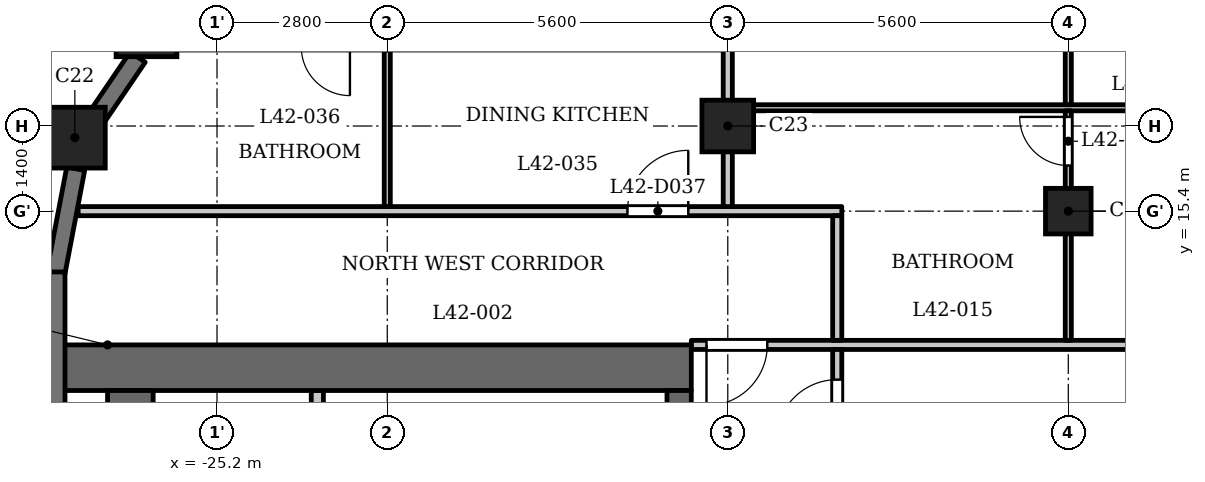
"""IFC4 building model, lengths in metres.
Left out: names, types, materials, properties, quantities, classifications, styles, units other than length and angle.
Written with IfcOpenShell. Run it as: python <this file> out.ifc"""

import sys

from ifc_helpers import new_model, si_unit, direction, frame, frame_2d, origin, origin_2d, place, context, subcontext, project, spatial, rectangle, extrude, element, fill, save


model = new_model("IFC4")
c1 = context("Model", 3, precision=1e-05, world=origin(), true_north=direction((0.0, 1.0)))
c2 = subcontext(c1, "Body", "Model", "MODEL_VIEW")
j1 = project(units=[si_unit("LENGTHUNIT", "METRE"), si_unit("PLANEANGLEUNIT", "RADIAN")], contexts=[c1])
p1 = place(None, origin())
s1 = spatial("IfcSite", under=j1, at=p1, CompositionType="ELEMENT")
p2 = place(p1, origin())
s2 = spatial("IfcBuilding", under=s1, at=p2, CompositionType="ELEMENT")
p3 = place(p2, frame((0.0, 0.0, 164.1)))
s3 = spatial("IfcBuildingStorey", under=s2, at=p3, CompositionType="ELEMENT", Elevation=164.1)
for number, where, z_axis, x_axis in (
    (1, (-26.36, 18.44, 0.0), (0.0, 0.0, 1.0), (1.0, 0.0, 0.0)),
    (2, (-27.538, 16.609, 0.0), (0.0, 0.0, 1.0), (1.0, 0.0, 0.0)),
):
    element("IfcColumn", number, at=place(p3, frame(where, z_axis=z_axis, x_axis=x_axis)), inside=s3, PredefinedType="COLUMN", context=c2, shape_type="SweptSolid", body=[
        extrude(rectangle(XDim=1.0, YDim=1.0, at=origin_2d()), origin(), (0.0, 0.0, 1.0), 3.5),
    ])
p4 = place(p3, frame((-16.8, 16.8, 0.0), z_axis=(0.0, 0.0, 1.0), x_axis=(1.0, 0.0, 0.0)))
e3 = element("IfcColumn", 3, at=p4, inside=s3, PredefinedType="COLUMN", context=c2, shape_type="SweptSolid", body=[
    extrude(rectangle(XDim=0.85, YDim=0.85, at=origin_2d()), origin(), (0.0, 0.0, 1.0), 3.5),
])
p5 = place(p3, frame((-11.2, 15.4, 0.0), z_axis=(0.0, 0.0, 1.0), x_axis=(1.0, 0.0, 0.0)))
e4 = element("IfcColumn", 4, at=p5, inside=s3, PredefinedType="COLUMN", context=c2, shape_type="SweptSolid", body=[
    extrude(rectangle(XDim=0.75, YDim=0.75, at=origin_2d()), origin(), (0.0, 0.0, 1.0), 3.5),
])
p6 = place(p3, frame((-26.504, 17.934, 0.0), z_axis=(0.0, 0.0, 1.0), x_axis=(-0.562145470373, -0.827038372833, 0.0)))
e5 = element("IfcWall", 5, at=p6, inside=s3, PredefinedType="SOLIDWALL", context=c2, shape_type="SweptSolid", body=[
    extrude(rectangle(XDim=1.177, YDim=0.3, at=frame_2d((0.588, 0.0))), origin(), (0.0, 0.0, 1.0), 3.2),
])
p7 = place(p3, frame((-27.524, 16.097, 0.0), z_axis=(0.0, 0.0, 1.0), x_axis=(-0.187259034321, -0.982310569049, 0.0)))
e6 = element("IfcWall", 6, at=p7, inside=s3, PredefinedType="SOLIDWALL", context=c2, shape_type="SweptSolid", body=[
    extrude(rectangle(XDim=1.756, YDim=0.3, at=frame_2d((0.878, 0.0))), origin(), (0.0, 0.0, 1.0), 2.45),
])
p8 = place(p3, frame((-27.85, 14.4, 0.0), z_axis=(0.0, 0.0, 1.0), x_axis=(0.0, -1.0, 0.0)))
e7 = element("IfcWall", 7, at=p8, inside=s3, PredefinedType="SOLIDWALL", context=c2, shape_type="SweptSolid", body=[
    extrude(rectangle(XDim=2.7, YDim=0.3, at=frame_2d((1.35, 0.0))), origin(), (0.0, 0.0, 1.0), 2.45),
])
p9 = place(p3, frame((-17.4, 12.825, 0.0), z_axis=(0.0, 0.0, 1.0), x_axis=(-1.0, 0.0, 0.0)))
e8 = element("IfcWall", 8, at=p9, inside=s3, PredefinedType="SHEAR", context=c2, shape_type="SweptSolid", body=[
    extrude(rectangle(XDim=10.4, YDim=0.75, at=frame_2d((5.2, 0.0))), origin(), (0.0, 0.0, 1.0), 3.2),
])
p10 = place(p3, frame((-17.6, -12.45, 0.0), z_axis=(0.0, 0.0, 1.0), x_axis=(0.0, 1.0, 0.0)))
e9 = element("IfcWall", 9, at=p10, inside=s3, PredefinedType="SHEAR", context=c2, shape_type="SweptSolid", body=[
    extrude(rectangle(XDim=24.9, YDim=0.4, at=frame_2d((12.45, 0.0))), origin(), (0.0, 0.0, 1.0), 3.2),
])
p11 = place(p10, frame((8.65, 0.0, 0.0)))
e10 = element("IfcOpeningElement", 10, at=p11, cuts=e9, PredefinedType="OPENING", context=c2, shape_type="SweptSolid", body=[
    extrude(rectangle(XDim=0.9, YDim=2.1, at=frame_2d((0.45, 1.05))), frame((0.0, 0.21, 0.0), z_axis=(0.0, -1.0, 0.0), x_axis=(1.0, 0.0, 0.0)), (0.0, 0.0, 1.0), 0.42),
])
p12 = place(p10, frame((15.6, 0.0, 0.0)))
e11 = element("IfcOpeningElement", 11, at=p12, cuts=e9, PredefinedType="OPENING", context=c2, shape_type="SweptSolid", body=[
    extrude(rectangle(XDim=1.1, YDim=2.1, at=frame_2d((0.55, 1.05))), frame((0.0, 0.21, 0.0), z_axis=(0.0, -1.0, 0.0), x_axis=(1.0, 0.0, 0.0)), (0.0, 0.0, 1.0), 0.42),
])
p13 = place(p10, frame((18.0, 0.0, 0.0)))
e12 = element("IfcOpeningElement", 12, at=p13, cuts=e9, PredefinedType="OPENING", context=c2, shape_type="SweptSolid", body=[
    extrude(rectangle(XDim=1.1, YDim=2.1, at=frame_2d((0.55, 1.05))), frame((0.0, 0.21, 0.0), z_axis=(0.0, -1.0, 0.0), x_axis=(1.0, 0.0, 0.0)), (0.0, 0.0, 1.0), 0.42),
])
p14 = place(p10, frame((23.025, 0.0, 0.0)))
e13 = element("IfcOpeningElement", 13, at=p14, cuts=e9, PredefinedType="OPENING", context=c2, shape_type="SweptSolid", body=[
    extrude(rectangle(XDim=1.1, YDim=2.1, at=frame_2d((0.55, 1.05))), frame((0.0, 0.21, 0.0), z_axis=(0.0, -1.0, 0.0), x_axis=(1.0, 0.0, 0.0)), (0.0, 0.0, 1.0), 0.42),
])
p15 = place(p10, frame((0.775, 0.0, 0.0)))
e14 = element("IfcOpeningElement", 14, at=p15, cuts=e9, PredefinedType="OPENING", context=c2, shape_type="SweptSolid", body=[
    extrude(rectangle(XDim=1.1, YDim=2.1, at=frame_2d((0.55, 1.05))), frame((0.0, 0.21, 0.0), z_axis=(0.0, -1.0, 0.0), x_axis=(1.0, 0.0, 0.0)), (0.0, 0.0, 1.0), 0.42),
])
p16 = place(p10, frame((12.925, 0.0, 0.0)))
e15 = element("IfcOpeningElement", 15, at=p16, cuts=e9, PredefinedType="OPENING", context=c2, shape_type="SweptSolid", body=[
    extrude(rectangle(XDim=1.8, YDim=2.1, at=frame_2d((0.9, 1.05))), frame((0.0, 0.21, 0.0), z_axis=(0.0, -1.0, 0.0), x_axis=(1.0, 0.0, 0.0)), (0.0, 0.0, 1.0), 0.42),
])
p17 = place(p3, frame((-26.625, -12.45, 0.0), z_axis=(0.0, 0.0, 1.0), x_axis=(0.0, 1.0, 0.0)))
e16 = element("IfcWall", 16, at=p17, inside=s3, PredefinedType="SHEAR", context=c2, shape_type="SweptSolid", body=[
    extrude(rectangle(XDim=24.9, YDim=0.75, at=frame_2d((12.45, 0.0))), origin(), (0.0, 0.0, 1.0), 3.2),
])
p18 = place(p3, frame((-23.55, 9.8, 0.0), z_axis=(0.0, 0.0, 1.0), x_axis=(0.0, 1.0, 0.0)))
e17 = element("IfcWall", 17, at=p18, inside=s3, PredefinedType="PARTITIONING", context=c2, shape_type="SweptSolid", body=[
    extrude(rectangle(XDim=2.65, YDim=0.2, at=frame_2d((1.325, 0.0))), origin(), (0.0, 0.0, 1.0), 3.2),
])
p19 = place(p18, frame((0.875, 0.0, 0.0)))
e18 = element("IfcOpeningElement", 18, at=p19, cuts=e17, PredefinedType="OPENING", context=c2, shape_type="SweptSolid", body=[
    extrude(rectangle(XDim=0.9, YDim=2.1, at=frame_2d((0.45, 1.05))), frame((0.0, 0.11, 0.0), z_axis=(0.0, -1.0, 0.0), x_axis=(1.0, 0.0, 0.0)), (0.0, 0.0, 1.0), 0.22),
])
p20 = place(p3, frame((-17.4, 13.2, 0.0), z_axis=(0.0, 0.0, 1.0), x_axis=(1.0, 0.0, 0.0)))
e19 = element("IfcWall", 19, at=p20, inside=s3, PredefinedType="PARTITIONING", context=c2, shape_type="SweptSolid", body=[
    extrude(rectangle(XDim=34.8, YDim=0.15, at=frame_2d((17.4, 0.0))), origin(), (0.0, 0.0, 1.0), 3.2),
])
p21 = place(p20, frame((0.25, 0.0, 0.0)))
e20 = element("IfcOpeningElement", 20, at=p21, cuts=e19, PredefinedType="OPENING", context=c2, shape_type="SweptSolid", body=[
    extrude(rectangle(XDim=1.0, YDim=2.1, at=frame_2d((0.5, 1.05))), frame((0.0, 0.085, 0.0), z_axis=(0.0, -1.0, 0.0), x_axis=(1.0, 0.0, 0.0)), (0.0, 0.0, 1.0), 0.17),
])
p22 = place(p20, frame((33.65, 0.0, 0.0)))
e21 = element("IfcOpeningElement", 21, at=p22, cuts=e19, PredefinedType="OPENING", context=c2, shape_type="SweptSolid", body=[
    extrude(rectangle(XDim=1.0, YDim=2.1, at=frame_2d((0.5, 1.05))), frame((0.0, 0.085, 0.0), z_axis=(0.0, -1.0, 0.0), x_axis=(1.0, 0.0, 0.0)), (0.0, 0.0, 1.0), 0.17),
])
p23 = place(p20, frame((15.75, 0.0, 0.0)))
e22 = element("IfcOpeningElement", 22, at=p23, cuts=e19, PredefinedType="OPENING", context=c2, shape_type="SweptSolid", body=[
    extrude(rectangle(XDim=1.0, YDim=2.1, at=frame_2d((0.5, 1.05))), frame((0.0, 0.085, 0.0), z_axis=(0.0, -1.0, 0.0), x_axis=(1.0, 0.0, 0.0)), (0.0, 0.0, 1.0), 0.17),
])
p24 = place(p20, frame((20.85, 0.0, 0.0)))
e23 = element("IfcOpeningElement", 23, at=p24, cuts=e19, PredefinedType="OPENING", context=c2, shape_type="SweptSolid", body=[
    extrude(rectangle(XDim=1.0, YDim=2.1, at=frame_2d((0.5, 1.05))), frame((0.0, 0.085, 0.0), z_axis=(0.0, -1.0, 0.0), x_axis=(1.0, 0.0, 0.0)), (0.0, 0.0, 1.0), 0.17),
])
p25 = place(p20, frame((23.55, 0.0, 0.0)))
e24 = element("IfcOpeningElement", 24, at=p25, cuts=e19, PredefinedType="OPENING", context=c2, shape_type="SweptSolid", body=[
    extrude(rectangle(XDim=1.0, YDim=2.1, at=frame_2d((0.5, 1.05))), frame((0.0, 0.085, 0.0), z_axis=(0.0, -1.0, 0.0), x_axis=(1.0, 0.0, 0.0)), (0.0, 0.0, 1.0), 0.17),
])
p26 = place(p3, frame((-27.484, 15.4, 0.0), z_axis=(0.0, 0.0, 1.0), x_axis=(1.0, 0.0, 0.0)))
e25 = element("IfcWall", 25, at=p26, inside=s3, PredefinedType="PARTITIONING", context=c2, shape_type="SweptSolid", body=[
    extrude(rectangle(XDim=12.559, YDim=0.15, at=frame_2d((6.279, 0.0))), origin(), (0.0, 0.0, 1.0), 3.2),
])
p27 = place(p26, frame((9.034, 0.0, 0.0)))
e26 = element("IfcOpeningElement", 26, at=p27, cuts=e25, PredefinedType="OPENING", context=c2, shape_type="SweptSolid", body=[
    extrude(rectangle(XDim=1.0, YDim=2.1, at=frame_2d((0.5, 1.05))), frame((0.0, 0.085, 0.0), z_axis=(0.0, -1.0, 0.0), x_axis=(1.0, 0.0, 0.0)), (0.0, 0.0, 1.0), 0.17),
])
p28 = place(p3, frame((-16.725, 17.1, 0.0), z_axis=(0.0, 0.0, 1.0), x_axis=(1.0, 0.0, 0.0)))
e27 = element("IfcWall", 27, at=p28, inside=s3, PredefinedType="PARTITIONING", context=c2, shape_type="SweptSolid", body=[
    extrude(rectangle(XDim=33.45, YDim=0.1, at=frame_2d((16.725, 0.0))), origin(), (0.0, 0.0, 1.0), 3.2),
])
p29 = place(p28, frame((11.925, 0.0, 0.0)))
e28 = element("IfcOpeningElement", 28, at=p29, cuts=e27, PredefinedType="OPENING", context=c2, shape_type="SweptSolid", body=[
    extrude(rectangle(XDim=0.9, YDim=2.1, at=frame_2d((0.45, 1.05))), frame((0.0, 0.06, 0.0), z_axis=(0.0, -1.0, 0.0), x_axis=(1.0, 0.0, 0.0)), (0.0, 0.0, 1.0), 0.12),
])
p30 = place(p28, frame((15.175, 0.0, 0.0)))
e29 = element("IfcOpeningElement", 29, at=p30, cuts=e27, PredefinedType="OPENING", context=c2, shape_type="SweptSolid", body=[
    extrude(rectangle(XDim=0.9, YDim=2.1, at=frame_2d((0.45, 1.05))), frame((0.0, 0.06, 0.0), z_axis=(0.0, -1.0, 0.0), x_axis=(1.0, 0.0, 0.0)), (0.0, 0.0, 1.0), 0.12),
])
p31 = place(p28, frame((6.575, 0.0, 0.0)))
e30 = element("IfcOpeningElement", 30, at=p31, cuts=e27, PredefinedType="OPENING", context=c2, shape_type="SweptSolid", body=[
    extrude(rectangle(XDim=0.9, YDim=2.1, at=frame_2d((0.45, 1.05))), frame((0.0, 0.06, 0.0), z_axis=(0.0, -1.0, 0.0), x_axis=(1.0, 0.0, 0.0)), (0.0, 0.0, 1.0), 0.12),
])
p32 = place(p28, frame((17.375, 0.0, 0.0)))
e31 = element("IfcOpeningElement", 31, at=p32, cuts=e27, PredefinedType="OPENING", context=c2, shape_type="SweptSolid", body=[
    extrude(rectangle(XDim=0.8, YDim=2.1, at=frame_2d((0.4, 1.05))), frame((0.0, 0.06, 0.0), z_axis=(0.0, -1.0, 0.0), x_axis=(1.0, 0.0, 0.0)), (0.0, 0.0, 1.0), 0.12),
])
p33 = place(p28, frame((20.025, 0.0, 0.0)))
e32 = element("IfcOpeningElement", 32, at=p33, cuts=e27, PredefinedType="OPENING", context=c2, shape_type="SweptSolid", body=[
    extrude(rectangle(XDim=0.9, YDim=2.1, at=frame_2d((0.45, 1.05))), frame((0.0, 0.06, 0.0), z_axis=(0.0, -1.0, 0.0), x_axis=(1.0, 0.0, 0.0)), (0.0, 0.0, 1.0), 0.12),
])
p34 = place(p28, frame((26.425, 0.0, 0.0)))
e33 = element("IfcOpeningElement", 33, at=p34, cuts=e27, PredefinedType="OPENING", context=c2, shape_type="SweptSolid", body=[
    extrude(rectangle(XDim=0.8, YDim=2.1, at=frame_2d((0.4, 1.05))), frame((0.0, 0.06, 0.0), z_axis=(0.0, -1.0, 0.0), x_axis=(1.0, 0.0, 0.0)), (0.0, 0.0, 1.0), 0.12),
])
p35 = place(p28, frame((23.025, 0.0, 0.0)))
e34 = element("IfcOpeningElement", 34, at=p35, cuts=e27, PredefinedType="OPENING", context=c2, shape_type="SweptSolid", body=[
    extrude(rectangle(XDim=0.9, YDim=2.1, at=frame_2d((0.45, 1.05))), frame((0.0, 0.06, 0.0), z_axis=(0.0, -1.0, 0.0), x_axis=(1.0, 0.0, 0.0)), (0.0, 0.0, 1.0), 0.12),
])
p36 = place(p28, frame((28.575, 0.0, 0.0)))
e35 = element("IfcOpeningElement", 35, at=p36, cuts=e27, PredefinedType="OPENING", context=c2, shape_type="SweptSolid", body=[
    extrude(rectangle(XDim=0.8, YDim=2.1, at=frame_2d((0.4, 1.05))), frame((0.0, 0.06, 0.0), z_axis=(0.0, -1.0, 0.0), x_axis=(1.0, 0.0, 0.0)), (0.0, 0.0, 1.0), 0.12),
])
p37 = place(p28, frame((30.725, 0.0, 0.0)))
e36 = element("IfcOpeningElement", 36, at=p37, cuts=e27, PredefinedType="OPENING", context=c2, shape_type="SweptSolid", body=[
    extrude(rectangle(XDim=0.9, YDim=2.1, at=frame_2d((0.45, 1.05))), frame((0.0, 0.06, 0.0), z_axis=(0.0, -1.0, 0.0), x_axis=(1.0, 0.0, 0.0)), (0.0, 0.0, 1.0), 0.12),
])
p38 = place(p3, frame((-22.4, 15.475, 0.0), z_axis=(0.0, 0.0, 1.0), x_axis=(0.0, 1.0, 0.0)))
e37 = element("IfcWall", 37, at=p38, inside=s3, PredefinedType="PARTITIONING", context=c2, shape_type="SweptSolid", body=[
    extrude(rectangle(XDim=2.575, YDim=0.1, at=frame_2d((1.288, 0.0))), origin(), (0.0, 0.0, 1.0), 3.2),
])
p39 = place(p3, frame((-16.8, 15.475, 0.0), z_axis=(0.0, 0.0, 1.0), x_axis=(0.0, 1.0, 0.0)))
e38 = element("IfcWall", 38, at=p39, inside=s3, PredefinedType="PARTITIONING", context=c2, shape_type="SweptSolid", body=[
    extrude(rectangle(XDim=7.405, YDim=0.15, at=frame_2d((3.702, 0.0))), origin(), (0.0, 0.0, 1.0), 3.2),
])
p40 = place(p3, frame((-15.0, 6.769, 0.0), z_axis=(0.0, 0.0, 1.0), x_axis=(0.0, 1.0, 0.0)))
e39 = element("IfcWall", 39, at=p40, inside=s3, PredefinedType="PARTITIONING", context=c2, shape_type="SweptSolid", body=[
    extrude(rectangle(XDim=6.356, YDim=0.15, at=frame_2d((3.178, 0.0))), origin(), (0.0, 0.0, 1.0), 3.2),
])
p41 = place(p40, frame((4.86, 0.0, 0.0)))
e40 = element("IfcOpeningElement", 40, at=p41, cuts=e39, PredefinedType="OPENING", context=c2, shape_type="SweptSolid", body=[
    extrude(rectangle(XDim=1.0, YDim=2.1, at=frame_2d((0.5, 1.05))), frame((0.0, 0.085, 0.0), z_axis=(0.0, -1.0, 0.0), x_axis=(1.0, 0.0, 0.0)), (0.0, 0.0, 1.0), 0.17),
])
p42 = place(p3, frame((-15.0, 13.275, 0.0), z_axis=(0.0, 0.0, 1.0), x_axis=(0.0, 1.0, 0.0)))
e41 = element("IfcWall", 41, at=p42, inside=s3, PredefinedType="PARTITIONING", context=c2, shape_type="SweptSolid", body=[
    extrude(rectangle(XDim=2.05, YDim=0.15, at=frame_2d((1.025, 0.0))), origin(), (0.0, 0.0, 1.0), 3.2),
])
p43 = place(p3, frame((-11.2, 13.275, 0.0), z_axis=(0.0, 0.0, 1.0), x_axis=(0.0, 1.0, 0.0)))
e42 = element("IfcWall", 42, at=p43, inside=s3, PredefinedType="PARTITIONING", context=c2, shape_type="SweptSolid", body=[
    extrude(rectangle(XDim=3.775, YDim=0.1, at=frame_2d((1.888, 0.0))), origin(), (0.0, 0.0, 1.0), 3.2),
])
p44 = place(p43, frame((2.875, 0.0, 0.0)))
e43 = element("IfcOpeningElement", 43, at=p44, cuts=e42, PredefinedType="OPENING", context=c2, shape_type="SweptSolid", body=[
    extrude(rectangle(XDim=0.8, YDim=2.1, at=frame_2d((0.4, 1.05))), frame((0.0, 0.06, 0.0), z_axis=(0.0, -1.0, 0.0), x_axis=(1.0, 0.0, 0.0)), (0.0, 0.0, 1.0), 0.12),
])
p45 = place(p3, frame((-11.2, 17.15, 0.0), z_axis=(0.0, 0.0, 1.0), x_axis=(0.0, 1.0, 0.0)))
e44 = element("IfcWall", 44, at=p45, inside=s3, PredefinedType="PARTITIONING", context=c2, shape_type="SweptSolid", body=[
    extrude(rectangle(XDim=5.73, YDim=0.1, at=frame_2d((2.865, 0.0))), origin(), (0.0, 0.0, 1.0), 3.2),
])
p46 = place(p45, frame((3.61, 0.0, 0.0)))
e45 = element("IfcOpeningElement", 45, at=p46, cuts=e44, PredefinedType="OPENING", context=c2, shape_type="SweptSolid", body=[
    extrude(rectangle(XDim=0.9, YDim=2.1, at=frame_2d((0.45, 1.05))), frame((0.0, 0.06, 0.0), z_axis=(0.0, -1.0, 0.0), x_axis=(1.0, 0.0, 0.0)), (0.0, 0.0, 1.0), 0.12),
])
p47 = place(p41, origin())
e46 = element("IfcDoor", 46, at=p47, inside=s3, OperationType="SINGLE_SWING_RIGHT", PredefinedType="DOOR", context=c2, shape_type="SweptSolid", body=[
    extrude(rectangle(XDim=1.0, YDim=2.1, at=frame_2d((0.5, 1.05))), frame((0.0, 0.025, 0.0), z_axis=(0.0, -1.0, 0.0), x_axis=(1.0, 0.0, 0.0)), (0.0, 0.0, 1.0), 0.05),
])
fill(e40, e46)
p48 = place(p21, origin())
e47 = element("IfcDoor", 47, at=p48, inside=s3, OperationType="SINGLE_SWING_LEFT", PredefinedType="DOOR", context=c2, shape_type="SweptSolid", body=[
    extrude(rectangle(XDim=1.0, YDim=2.1, at=frame_2d((0.5, 1.05))), frame((0.0, 0.025, 0.0), z_axis=(0.0, -1.0, 0.0), x_axis=(1.0, 0.0, 0.0)), (0.0, 0.0, 1.0), 0.05),
])
fill(e20, e47)
p49 = place(p44, origin())
e48 = element("IfcDoor", 48, at=p49, inside=s3, OperationType="SINGLE_SWING_LEFT", PredefinedType="DOOR", context=c2, shape_type="SweptSolid", body=[
    extrude(rectangle(XDim=0.8, YDim=2.1, at=frame_2d((0.4, 1.05))), frame((0.0, 0.025, 0.0), z_axis=(0.0, -1.0, 0.0), x_axis=(1.0, 0.0, 0.0)), (0.0, 0.0, 1.0), 0.05),
])
fill(e43, e48)
p50 = place(p27, origin())
e49 = element("IfcDoor", 49, at=p50, inside=s3, OperationType="SINGLE_SWING_LEFT", PredefinedType="DOOR", context=c2, shape_type="SweptSolid", body=[
    extrude(rectangle(XDim=1.0, YDim=2.1, at=frame_2d((0.5, 1.05))), frame((0.0, 0.025, 0.0), z_axis=(0.0, -1.0, 0.0), x_axis=(1.0, 0.0, 0.0)), (0.0, 0.0, 1.0), 0.05),
])
fill(e26, e49)
save(model, sys.argv[1])
